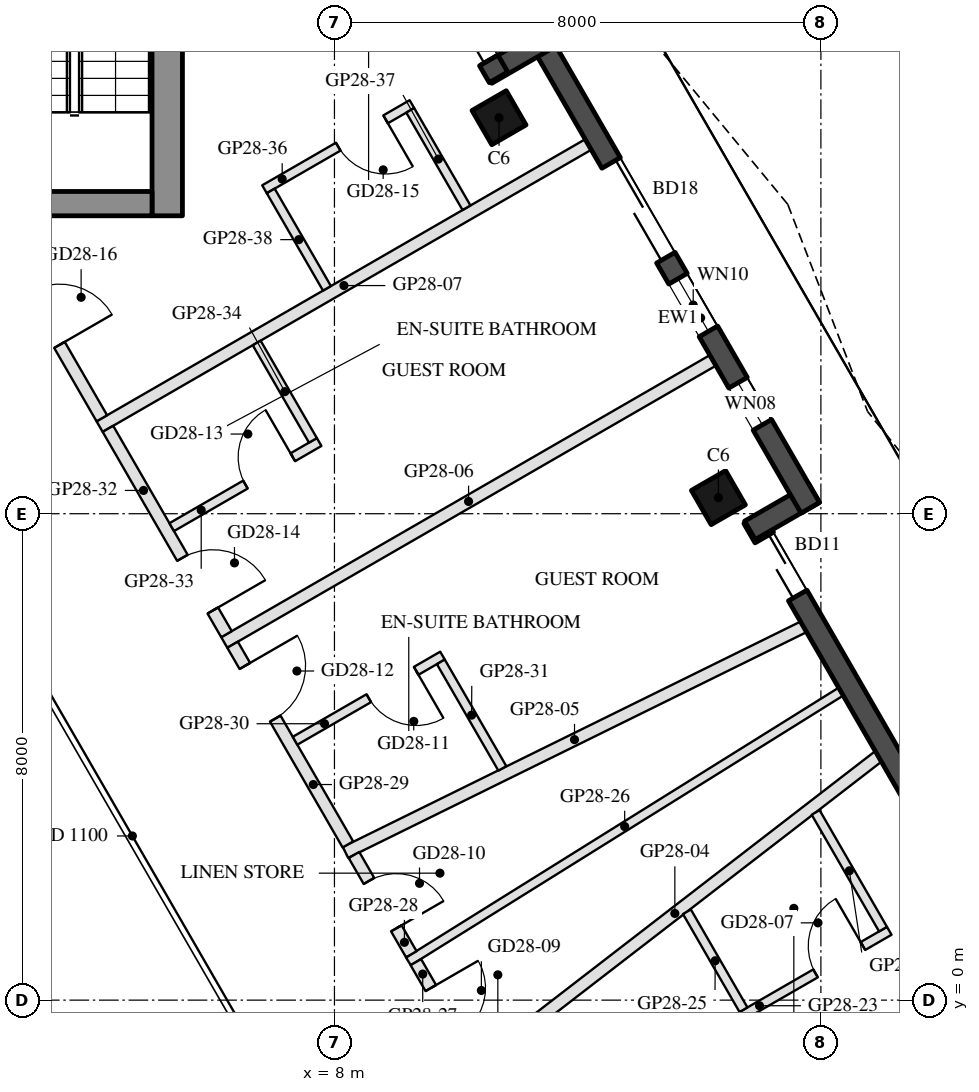
"""IFC4 building model, lengths in metres.
Left out: names, types, materials, properties, quantities, classifications, styles, units other than length and angle.
Written with IfcOpenShell. Run it as: python <this file> out.ifc"""

import sys

from ifc_helpers import new_model, si_unit, direction, frame, frame_2d, origin, origin_2d, place, context, subcontext, project, spatial, rectangle, hollow_rectangle, extrude, boolean, halfspace, element, fill, save


model = new_model("IFC4")
c1 = context("Model", 3, precision=1e-05, world=origin(), true_north=direction((0.0, 1.0)))
c2 = subcontext(c1, "Body", "Model", "MODEL_VIEW")
j1 = project(units=[si_unit("LENGTHUNIT", "METRE"), si_unit("PLANEANGLEUNIT", "RADIAN")], contexts=[c1])
p1 = place(None, origin())
s1 = spatial("IfcSite", under=j1, at=p1, CompositionType="ELEMENT")
p2 = place(p1, origin())
s2 = spatial("IfcBuilding", under=s1, at=p2, CompositionType="ELEMENT")
p3 = place(p2, frame((0.0, 0.0, 280.0)))
s3 = spatial("IfcBuildingStorey", under=s2, at=p3, CompositionType="ELEMENT", Elevation=280.0)
p4 = place(p3, frame((14.314, 8.264, 0.0), z_axis=(0.0, 0.0, 1.0), x_axis=(-0.5, 0.866025403784, 0.0)))
e1 = element("IfcColumn", 1, at=p4, inside=s3, PredefinedType="COLUMN", context=c2, shape_type="SweptSolid", body=[
    boolean("DIFFERENCE", extrude(hollow_rectangle(XDim=0.65, YDim=0.65, WallThickness=0.03, at=origin_2d()), origin(), (0.0, 0.0, 1.0), 3.7), halfspace(frame((0.0, 0.0, 0.037), z_axis=(0.0, 0.0, 1.0), x_axis=(1.0, 0.0, 0.0)), True)),
])
p5 = place(p3, frame((10.707, 14.513, 0.0), z_axis=(0.0, 0.0, 1.0), x_axis=(-0.5, 0.866025403784, 0.0)))
e2 = element("IfcColumn", 2, at=p5, inside=s3, PredefinedType="COLUMN", context=c2, shape_type="SweptSolid", body=[
    boolean("DIFFERENCE", extrude(hollow_rectangle(XDim=0.65, YDim=0.65, WallThickness=0.03, at=origin_2d()), origin(), (0.0, 0.0, 1.0), 3.7), halfspace(frame((0.0, 0.0, 0.04), z_axis=(0.0, 0.0, 1.0), x_axis=(1.0, 0.0, 0.0)), True)),
])
p6 = place(p3, frame((17.913, 2.68, 0.0), z_axis=(0.0, 0.0, 1.0), x_axis=(-0.499985371027, 0.866033849661, 0.0)))
e3 = element("IfcWall", 3, at=p6, inside=s3, PredefinedType="SOLIDWALL", context=c2, shape_type="SweptSolid", body=[
    extrude(rectangle(XDim=6.055, YDim=0.35, at=frame_2d((3.028, 0.0))), origin(), (0.0, 0.0, 1.0), 3.55),
])
p7 = place(p6, frame((4.59, 0.0, 0.0)))
e4 = element("IfcOpeningElement", 4, at=p7, cuts=e3, PredefinedType="OPENING", context=c2, shape_type="SweptSolid", body=[
    extrude(rectangle(XDim=1.1, YDim=2.4, at=frame_2d((0.55, 1.2))), frame((0.0, 0.185, 0.0), z_axis=(0.0, -1.0, 0.0), x_axis=(1.0, 0.0, 0.0)), (0.0, 0.0, 1.0), 0.37),
])
p8 = place(p3, frame((14.833, 7.727, 0.0), z_axis=(0.0, 0.0, 1.0), x_axis=(0.866142280446, 0.499797509021, 0.0)))
e5 = element("IfcWall", 5, at=p8, inside=s3, PredefinedType="SOLIDWALL", context=c2, shape_type="SweptSolid", body=[
    extrude(rectangle(XDim=1.22, YDim=0.35, at=frame_2d((0.61, 0.0))), origin(), (0.0, 0.0, 1.0), 3.55),
])
p9 = place(p3, frame((15.825, 8.097, 0.0), z_axis=(0.0, 0.0, 1.0), x_axis=(-0.500006872736, 0.866021435772, 0.0)))
e6 = element("IfcWall", 6, at=p9, inside=s3, PredefinedType="SOLIDWALL", context=c2, shape_type="SweptSolid", body=[
    extrude(rectangle(XDim=9.015, YDim=0.35, at=frame_2d((4.508, 0.0))), origin(), (0.0, 0.0, 1.0), 3.55),
])
p10 = place(p9, frame((1.575, 0.0, 0.3)))
e7 = element("IfcOpeningElement", 7, at=p10, cuts=e6, PredefinedType="OPENING", context=c2, shape_type="SweptSolid", body=[
    extrude(rectangle(XDim=0.8, YDim=2.65, at=frame_2d((0.4, 1.325))), frame((0.0, 0.185, 0.0), z_axis=(0.0, -1.0, 0.0), x_axis=(1.0, 0.0, 0.0)), (0.0, 0.0, 1.0), 0.37),
])
p11 = place(p9, frame((4.75, 0.0, 0.0)))
e8 = element("IfcOpeningElement", 8, at=p11, cuts=e6, PredefinedType="OPENING", context=c2, shape_type="SweptSolid", body=[
    extrude(rectangle(XDim=1.8, YDim=2.4, at=frame_2d((0.9, 1.2))), frame((0.0, 0.185, 0.0), z_axis=(0.0, -1.0, 0.0), x_axis=(1.0, 0.0, 0.0)), (0.0, 0.0, 1.0), 0.37),
])
p12 = place(p9, frame((3.35, 0.0, 0.3)))
e9 = element("IfcOpeningElement", 9, at=p12, cuts=e6, PredefinedType="OPENING", context=c2, shape_type="SweptSolid", body=[
    extrude(rectangle(XDim=1.0, YDim=2.65, at=frame_2d((0.5, 1.325))), frame((0.0, 0.185, 0.0), z_axis=(0.0, -1.0, 0.0), x_axis=(1.0, 0.0, 0.0)), (0.0, 0.0, 1.0), 0.37),
])
p13 = place(p3, frame((11.557, 15.841, 0.0), z_axis=(0.0, 0.0, 1.0), x_axis=(-0.866005645448, -0.500034220881, 0.0)))
e10 = element("IfcWall", 10, at=p13, inside=s3, PredefinedType="SOLIDWALL", context=c2, shape_type="SweptSolid", body=[
    extrude(rectangle(XDim=1.22, YDim=0.35, at=frame_2d((0.61, 0.0))), origin(), (0.0, 0.0, 1.0), 3.55),
])
p14 = place(p3, frame((10.698, 15.178, 0.0), z_axis=(0.0, 0.0, 1.0), x_axis=(-0.499985371027, 0.866033849661, 0.0)))
e11 = element("IfcWall", 11, at=p14, inside=s3, PredefinedType="SOLIDWALL", context=c2, shape_type="SweptSolid", body=[
    extrude(rectangle(XDim=6.055, YDim=0.35, at=frame_2d((3.028, 0.0))), origin(), (0.0, 0.0, 1.0), 3.55),
])
p15 = place(p14, frame((0.32, 0.0, 0.0)))
e12 = element("IfcOpeningElement", 12, at=p15, cuts=e11, PredefinedType="OPENING", context=c2, shape_type="SweptSolid", body=[
    extrude(rectangle(XDim=2.4, YDim=2.4, at=frame_2d((1.2, 1.2))), frame((0.0, 0.185, 0.0), z_axis=(0.0, -1.0, 0.0), x_axis=(1.0, 0.0, 0.0)), (0.0, 0.0, 1.0), 0.37),
])
p16 = place(p14, frame((3.02, 0.0, 0.3)))
e13 = element("IfcOpeningElement", 13, at=p16, cuts=e11, PredefinedType="OPENING", context=c2, shape_type="SweptSolid", body=[
    extrude(rectangle(XDim=2.7, YDim=2.65, at=frame_2d((1.35, 1.325))), frame((0.0, 0.185, 0.0), z_axis=(0.0, -1.0, 0.0), x_axis=(1.0, 0.0, 0.0)), (0.0, 0.0, 1.0), 0.37),
])
p17 = place(p3, frame((5.25, 12.9, 0.0), z_axis=(0.0, 0.0, 1.0), x_axis=(0.0, 1.0, 0.0)))
e14 = element("IfcWall", 14, at=p17, inside=s3, PredefinedType="SHEAR", context=c2, shape_type="SweptSolid", body=[
    extrude(rectangle(XDim=12.129, YDim=0.5, at=frame_2d((6.064, 0.0))), origin(), (0.0, 0.0, 1.0), 3.5),
])
p18 = place(p3, frame((5.0, 13.1, 0.0), z_axis=(0.0, 0.0, 1.0), x_axis=(-1.0, 0.0, 0.0)))
e15 = element("IfcWall", 15, at=p18, inside=s3, PredefinedType="SHEAR", context=c2, shape_type="SweptSolid", body=[
    extrude(rectangle(XDim=10.0, YDim=0.4, at=frame_2d((5.0, 0.0))), origin(), (0.0, 0.0, 1.0), 3.5),
])
p19 = place(p18, frame((3.55, 0.0, 0.0)))
e16 = element("IfcOpeningElement", 16, at=p19, cuts=e15, PredefinedType="OPENING", context=c2, shape_type="SweptSolid", body=[
    extrude(rectangle(XDim=1.1, YDim=2.1, at=frame_2d((0.55, 1.05))), frame((0.0, 0.21, 0.0), z_axis=(0.0, -1.0, 0.0), x_axis=(1.0, 0.0, 0.0)), (0.0, 0.0, 1.0), 0.42),
])
p20 = place(p18, frame((5.85, 0.0, 0.0)))
e17 = element("IfcOpeningElement", 17, at=p20, cuts=e15, PredefinedType="OPENING", context=c2, shape_type="SweptSolid", body=[
    extrude(rectangle(XDim=1.4, YDim=2.1, at=frame_2d((0.7, 1.05))), frame((0.0, 0.21, 0.0), z_axis=(0.0, -1.0, 0.0), x_axis=(1.0, 0.0, 0.0)), (0.0, 0.0, 1.0), 0.42),
])
p21 = place(p3, frame((16.945, 4.008, 0.0), z_axis=(0.0, 0.0, 1.0), x_axis=(-0.791722394734, -0.610881043801, 0.0)))
e18 = element("IfcWall", 18, at=p21, inside=s3, PredefinedType="PARTITIONING", context=c2, shape_type="SweptSolid", body=[
    extrude(rectangle(XDim=8.454, YDim=0.2, at=frame_2d((4.227, 0.0))), origin(), (0.0, 0.0, 1.0), 3.16),
])
p22 = place(p3, frame((15.715, 6.139, 0.0), z_axis=(0.0, 0.0, 1.0), x_axis=(-0.897120508699, -0.44178591294, 0.0)))
e19 = element("IfcWall", 19, at=p22, inside=s3, PredefinedType="PARTITIONING", context=c2, shape_type="SweptSolid", body=[
    extrude(rectangle(XDim=8.397, YDim=0.2, at=frame_2d((4.198, 0.0))), origin(), (0.0, 0.0, 1.0), 3.16),
])
p23 = place(p3, frame((14.224, 10.521, 0.0), z_axis=(0.0, 0.0, 1.0), x_axis=(-0.866024341471, -0.500001839976, 0.0)))
e20 = element("IfcWall", 20, at=p23, inside=s3, PredefinedType="PARTITIONING", context=c2, shape_type="SweptSolid", body=[
    extrude(rectangle(XDim=9.279, YDim=0.2, at=frame_2d((4.639, 0.0))), origin(), (0.0, 0.0, 1.0), 3.16),
])
p24 = place(p3, frame((12.174, 14.072, 0.0), z_axis=(0.0, 0.0, 1.0), x_axis=(-0.866035734738, -0.499982105836, 0.0)))
e21 = element("IfcWall", 21, at=p24, inside=s3, PredefinedType="PARTITIONING", context=c2, shape_type="SweptSolid", body=[
    extrude(rectangle(XDim=9.279, YDim=0.2, at=frame_2d((4.639, 0.0))), origin(), (0.0, 0.0, 1.0), 3.16),
])
p25 = place(p3, frame((14.699, -0.26, 0.0), z_axis=(0.0, 0.0, 1.0), x_axis=(0.866034573852, 0.49998411664, 0.0)))
e22 = element("IfcWall", 22, at=p25, inside=s3, PredefinedType="PARTITIONING", context=c2, shape_type="SweptSolid", body=[
    extrude(rectangle(XDim=2.8, YDim=0.15, at=frame_2d((1.4, 0.0))), origin(), (0.0, 0.0, 1.0), 3.55),
])
p26 = place(p25, frame((1.4, 0.0, 0.0)))
e23 = element("IfcOpeningElement", 23, at=p26, cuts=e22, PredefinedType="OPENING", context=c2, shape_type="SweptSolid", body=[
    extrude(rectangle(XDim=0.9, YDim=2.1, at=frame_2d((0.45, 1.05))), frame((0.0, 0.085, 0.0), z_axis=(0.0, -1.0, 0.0), x_axis=(1.0, 0.0, 0.0)), (0.0, 0.0, 1.0), 0.17),
])
p27 = place(p3, frame((17.022, 1.167, 0.0), z_axis=(0.0, 0.0, 1.0), x_axis=(-0.499954515395, 0.866051662741, 0.0)))
e24 = element("IfcWall", 24, at=p27, inside=s3, PredefinedType="PARTITIONING", context=c2, shape_type="SweptSolid", body=[
    extrude(rectangle(XDim=2.216, YDim=0.15, at=frame_2d((1.108, 0.0))), origin(), (0.0, 0.0, 1.0), 3.05),
])
p28 = place(p3, frame((14.727, -0.158, 0.0), z_axis=(0.0, 0.0, 1.0), x_axis=(-0.499964847546, 0.866045698112, 0.0)))
e25 = element("IfcWall", 25, at=p28, inside=s3, PredefinedType="PARTITIONING", context=c2, shape_type="SweptSolid", body=[
    extrude(rectangle(XDim=1.86, YDim=0.15, at=frame_2d((0.93, 0.0))), origin(), (0.0, 0.0, 1.0), 3.05),
])
p29 = place(p3, frame((16.33, 5.074, 0.0), z_axis=(0.0, 0.0, 1.0), x_axis=(-0.848469139967, -0.52924485687, 0.0)))
e26 = element("IfcWall", 26, at=p29, inside=s3, PredefinedType="PARTITIONING", context=c2, shape_type="SweptSolid", body=[
    extrude(rectangle(XDim=8.384, YDim=0.15, at=frame_2d((4.192, 0.0))), origin(), (0.0, 0.0, 1.0), 3.16),
])
p30 = place(p3, frame((9.339, 0.625, 0.0), z_axis=(0.0, 0.0, 1.0), x_axis=(0.499999106059, -0.866025919901, 0.0)))
e27 = element("IfcWall", 27, at=p30, inside=s3, PredefinedType="PARTITIONING", context=c2, shape_type="SweptSolid", body=[
    extrude(rectangle(XDim=1.884, YDim=0.2, at=frame_2d((0.942, 0.0))), origin(), (0.0, 0.0, 1.0), 3.55),
])
p31 = place(p30, frame((0.492, 0.0, 0.0)))
e28 = element("IfcOpeningElement", 28, at=p31, cuts=e27, PredefinedType="OPENING", context=c2, shape_type="SweptSolid", body=[
    extrude(rectangle(XDim=0.9, YDim=2.1, at=frame_2d((0.45, 1.05))), frame((0.0, 0.11, 0.0), z_axis=(0.0, -1.0, 0.0), x_axis=(1.0, 0.0, 0.0)), (0.0, 0.0, 1.0), 0.22),
])
p32 = place(p3, frame((8.321, 2.387, 0.0), z_axis=(0.0, 0.0, 1.0), x_axis=(0.500081217305, -0.865978507874, 0.0)))
e29 = element("IfcWall", 29, at=p32, inside=s3, PredefinedType="PARTITIONING", context=c2, shape_type="SweptSolid", body=[
    extrude(rectangle(XDim=1.885, YDim=0.2, at=frame_2d((0.942, 0.0))), origin(), (0.0, 0.0, 1.0), 3.05),
])
p33 = place(p32, frame((0.492, 0.0, 0.0)))
e30 = element("IfcOpeningElement", 30, at=p33, cuts=e29, PredefinedType="OPENING", context=c2, shape_type="SweptSolid", body=[
    extrude(rectangle(XDim=0.9, YDim=2.1, at=frame_2d((0.45, 1.05))), frame((0.0, 0.11, 0.0), z_axis=(0.0, -1.0, 0.0), x_axis=(1.0, 0.0, 0.0)), (0.0, 0.0, 1.0), 0.22),
])
p34 = place(p3, frame((6.325, 5.845, 0.0), z_axis=(0.0, 0.0, 1.0), x_axis=(0.499988034227, -0.866032312117, 0.0)))
e31 = element("IfcWall", 31, at=p34, inside=s3, PredefinedType="PARTITIONING", context=c2, shape_type="SweptSolid", body=[
    extrude(rectangle(XDim=3.793, YDim=0.2, at=frame_2d((1.896, 0.0))), origin(), (0.0, 0.0, 1.0), 3.05),
])
p35 = place(p34, frame((0.403, 0.0, 0.0)))
e32 = element("IfcOpeningElement", 32, at=p35, cuts=e31, PredefinedType="OPENING", context=c2, shape_type="SweptSolid", body=[
    extrude(rectangle(XDim=1.0, YDim=2.1, at=frame_2d((0.5, 1.05))), frame((0.0, 0.11, 0.0), z_axis=(0.0, -1.0, 0.0), x_axis=(1.0, 0.0, 0.0)), (0.0, 0.0, 1.0), 0.22),
])
p36 = place(p3, frame((9.777, 5.666, 0.0), z_axis=(0.0, 0.0, 1.0), x_axis=(-0.865996816683, -0.500049511043, 0.0)))
e33 = element("IfcWall", 33, at=p36, inside=s3, PredefinedType="PARTITIONING", context=c2, shape_type="SweptSolid", body=[
    extrude(rectangle(XDim=2.8, YDim=0.15, at=frame_2d((1.4, 0.0))), origin(), (0.0, 0.0, 1.0), 3.05),
])
p37 = place(p36, frame((0.5, 0.0, 0.0)))
e34 = element("IfcOpeningElement", 34, at=p37, cuts=e33, PredefinedType="OPENING", context=c2, shape_type="SweptSolid", body=[
    extrude(rectangle(XDim=0.9, YDim=2.1, at=frame_2d((0.45, 1.05))), frame((0.0, 0.085, 0.0), z_axis=(0.0, -1.0, 0.0), x_axis=(1.0, 0.0, 0.0)), (0.0, 0.0, 1.0), 0.17),
])
p38 = place(p3, frame((10.761, 3.811, 0.0), z_axis=(0.0, 0.0, 1.0), x_axis=(-0.499941815747, 0.866058993873, 0.0)))
e35 = element("IfcWall", 35, at=p38, inside=s3, PredefinedType="PARTITIONING", context=c2, shape_type="SweptSolid", body=[
    extrude(rectangle(XDim=2.023, YDim=0.15, at=frame_2d((1.012, 0.0))), origin(), (0.0, 0.0, 1.0), 3.05),
])
p39 = place(p3, frame((4.275, 9.396, 0.0), z_axis=(0.0, 0.0, 1.0), x_axis=(0.499997012787, -0.866027128446, 0.0)))
e36 = element("IfcWall", 36, at=p39, inside=s3, PredefinedType="PARTITIONING", context=c2, shape_type="SweptSolid", body=[
    extrude(rectangle(XDim=3.9, YDim=0.2, at=frame_2d((1.95, 0.0))), origin(), (0.0, 0.0, 1.0), 3.05),
])
p40 = place(p39, frame((2.45, 0.0, 0.0)))
e37 = element("IfcOpeningElement", 37, at=p40, cuts=e36, PredefinedType="OPENING", context=c2, shape_type="SweptSolid", body=[
    extrude(rectangle(XDim=1.0, YDim=2.1, at=frame_2d((0.5, 1.05))), frame((0.0, 0.11, 0.0), z_axis=(0.0, -1.0, 0.0), x_axis=(1.0, 0.0, 0.0)), (0.0, 0.0, 1.0), 0.22),
])
p41 = place(p3, frame((5.324, 7.779, 0.0), z_axis=(0.0, 0.0, 1.0), x_axis=(0.865996816683, 0.500049511043, 0.0)))
e38 = element("IfcWall", 38, at=p41, inside=s3, PredefinedType="PARTITIONING", context=c2, shape_type="SweptSolid", body=[
    extrude(rectangle(XDim=2.8, YDim=0.15, at=frame_2d((1.4, 0.0))), origin(), (0.0, 0.0, 1.0), 3.55),
])
p42 = place(p41, frame((1.4, 0.0, 0.0)))
e39 = element("IfcOpeningElement", 39, at=p42, cuts=e38, PredefinedType="OPENING", context=c2, shape_type="SweptSolid", body=[
    extrude(rectangle(XDim=0.9, YDim=2.1, at=frame_2d((0.45, 1.05))), frame((0.0, 0.085, 0.0), z_axis=(0.0, -1.0, 0.0), x_axis=(1.0, 0.0, 0.0)), (0.0, 0.0, 1.0), 0.17),
])
p43 = place(p3, frame((7.646, 9.207, 0.0), z_axis=(0.0, 0.0, 1.0), x_axis=(-0.49994333299, 0.866058118026, 0.0)))
e40 = element("IfcWall", 40, at=p43, inside=s3, PredefinedType="PARTITIONING", context=c2, shape_type="SweptSolid", body=[
    extrude(rectangle(XDim=1.85, YDim=0.15, at=frame_2d((0.925, 0.0))), origin(), (0.0, 0.0, 1.0), 3.55),
])
p44 = place(p3, frame((2.281, 12.85, 0.0), z_axis=(0.0, 0.0, 1.0), x_axis=(0.499979074716, -0.866037484666, 0.0)))
e41 = element("IfcWall", 41, at=p44, inside=s3, PredefinedType="PARTITIONING", context=c2, shape_type="SweptSolid", body=[
    extrude(rectangle(XDim=3.788, YDim=0.2, at=frame_2d((1.894, 0.0))), origin(), (0.0, 0.0, 1.0), 3.05),
])
p45 = place(p44, frame((1.394, 0.0, 0.0)))
e42 = element("IfcOpeningElement", 42, at=p45, cuts=e41, PredefinedType="OPENING", context=c2, shape_type="SweptSolid", body=[
    extrude(rectangle(XDim=1.0, YDim=2.1, at=frame_2d((0.5, 1.05))), frame((0.0, 0.11, 0.0), z_axis=(0.0, -1.0, 0.0), x_axis=(1.0, 0.0, 0.0)), (0.0, 0.0, 1.0), 0.22),
])
p46 = place(p3, frame((9.274, 14.737, 0.0), z_axis=(0.0, 0.0, 1.0), x_axis=(-0.866018616679, -0.500011755427, 0.0)))
e43 = element("IfcWall", 43, at=p46, inside=s3, PredefinedType="PARTITIONING", context=c2, shape_type="SweptSolid", body=[
    extrude(rectangle(XDim=2.8, YDim=0.15, at=frame_2d((1.4, 0.0))), origin(), (0.0, 0.0, 1.0), 3.55),
])
p47 = place(p46, frame((0.5, 0.0, 0.0)))
e44 = element("IfcOpeningElement", 44, at=p47, cuts=e43, PredefinedType="OPENING", context=c2, shape_type="SweptSolid", body=[
    extrude(rectangle(XDim=0.9, YDim=2.1, at=frame_2d((0.45, 1.05))), frame((0.0, 0.085, 0.0), z_axis=(0.0, -1.0, 0.0), x_axis=(1.0, 0.0, 0.0)), (0.0, 0.0, 1.0), 0.17),
])
p48 = place(p3, frame((10.172, 13.032, 0.0), z_axis=(0.0, 0.0, 1.0), x_axis=(-0.500042316284, 0.866000971088, 0.0)))
e45 = element("IfcWall", 45, at=p48, inside=s3, PredefinedType="PARTITIONING", context=c2, shape_type="SweptSolid", body=[
    extrude(rectangle(XDim=1.85, YDim=0.15, at=frame_2d((0.925, 0.0))), origin(), (0.0, 0.0, 1.0), 3.05),
])
p49 = place(p3, frame((7.877, 11.707, 0.0), z_axis=(0.0, 0.0, 1.0), x_axis=(-0.499985172903, 0.866033964044, 0.0)))
e46 = element("IfcWall", 46, at=p49, inside=s3, PredefinedType="PARTITIONING", context=c2, shape_type="SweptSolid", body=[
    extrude(rectangle(XDim=1.85, YDim=0.15, at=frame_2d((0.925, 0.0))), origin(), (0.0, 0.0, 1.0), 3.05),
])
p50 = place(p7, frame((1.1, 0.0, 0.0), z_axis=(0.0, 0.0, 1.0), x_axis=(-1.0, 0.0, 0.0)))
e47 = element("IfcDoor", 47, at=p50, inside=s3, OperationType="SLIDING_TO_LEFT", PredefinedType="DOOR", context=c2, shape_type="SweptSolid", body=[
    extrude(rectangle(XDim=1.1, YDim=2.4, at=frame_2d((0.55, 1.2))), frame((0.0, 0.025, 0.0), z_axis=(0.0, -1.0, 0.0), x_axis=(1.0, 0.0, 0.0)), (0.0, 0.0, 1.0), 0.05),
])
fill(e4, e47)
p51 = place(p10, origin())
e48 = element("IfcWindow", 48, at=p51, inside=s3, PartitioningType="SINGLE_PANEL", PredefinedType="WINDOW", context=c2, shape_type="SweptSolid", body=[
    extrude(rectangle(XDim=0.8, YDim=2.65, at=frame_2d((0.4, 1.325))), frame((0.0, 0.03, 0.0), z_axis=(0.0, -1.0, 0.0), x_axis=(1.0, 0.0, 0.0)), (0.0, 0.0, 1.0), 0.06),
])
fill(e7, e48)
p52 = place(p11, frame((1.8, 0.0, 0.0), z_axis=(0.0, 0.0, 1.0), x_axis=(-1.0, 0.0, 0.0)))
e49 = element("IfcDoor", 49, at=p52, inside=s3, OperationType="SLIDING_TO_LEFT", PredefinedType="DOOR", context=c2, shape_type="SweptSolid", body=[
    extrude(rectangle(XDim=1.8, YDim=2.4, at=frame_2d((0.9, 1.2))), frame((0.0, 0.025, 0.0), z_axis=(0.0, -1.0, 0.0), x_axis=(1.0, 0.0, 0.0)), (0.0, 0.0, 1.0), 0.05),
])
fill(e8, e49)
p53 = place(p12, origin())
e50 = element("IfcWindow", 50, at=p53, inside=s3, PartitioningType="SINGLE_PANEL", PredefinedType="WINDOW", context=c2, shape_type="SweptSolid", body=[
    extrude(rectangle(XDim=1.0, YDim=2.65, at=frame_2d((0.5, 1.325))), frame((0.0, 0.03, 0.0), z_axis=(0.0, -1.0, 0.0), x_axis=(1.0, 0.0, 0.0)), (0.0, 0.0, 1.0), 0.06),
])
fill(e9, e50)
p54 = place(p15, frame((2.4, 0.0, 0.0), z_axis=(0.0, 0.0, 1.0), x_axis=(-1.0, 0.0, 0.0)))
e51 = element("IfcDoor", 51, at=p54, inside=s3, OperationType="SLIDING_TO_LEFT", PredefinedType="DOOR", context=c2, shape_type="SweptSolid", body=[
    extrude(rectangle(XDim=2.4, YDim=2.4, at=frame_2d((1.2, 1.2))), frame((0.0, 0.025, 0.0), z_axis=(0.0, -1.0, 0.0), x_axis=(1.0, 0.0, 0.0)), (0.0, 0.0, 1.0), 0.05),
])
fill(e12, e51)
p55 = place(p26, origin())
e52 = element("IfcDoor", 52, at=p55, inside=s3, OperationType="SINGLE_SWING_RIGHT", PredefinedType="DOOR", context=c2, shape_type="SweptSolid", body=[
    extrude(rectangle(XDim=0.9, YDim=2.1, at=frame_2d((0.45, 1.05))), frame((0.0, 0.025, 0.0), z_axis=(0.0, -1.0, 0.0), x_axis=(1.0, 0.0, 0.0)), (0.0, 0.0, 1.0), 0.05),
])
fill(e23, e52)
p56 = place(p31, origin())
e53 = element("IfcDoor", 53, at=p56, inside=s3, OperationType="SINGLE_SWING_LEFT", PredefinedType="DOOR", context=c2, shape_type="SweptSolid", body=[
    extrude(rectangle(XDim=0.9, YDim=2.1, at=frame_2d((0.45, 1.05))), frame((0.0, 0.025, 0.0), z_axis=(0.0, -1.0, 0.0), x_axis=(1.0, 0.0, 0.0)), (0.0, 0.0, 1.0), 0.05),
])
fill(e28, e53)
p57 = place(p33, origin())
e54 = element("IfcDoor", 54, at=p57, inside=s3, OperationType="SINGLE_SWING_RIGHT", PredefinedType="DOOR", context=c2, shape_type="SweptSolid", body=[
    extrude(rectangle(XDim=0.9, YDim=2.1, at=frame_2d((0.45, 1.05))), frame((0.0, 0.025, 0.0), z_axis=(0.0, -1.0, 0.0), x_axis=(1.0, 0.0, 0.0)), (0.0, 0.0, 1.0), 0.05),
])
fill(e30, e54)
p58 = place(p37, origin())
e55 = element("IfcDoor", 55, at=p58, inside=s3, OperationType="SINGLE_SWING_LEFT", PredefinedType="DOOR", context=c2, shape_type="SweptSolid", body=[
    extrude(rectangle(XDim=0.9, YDim=2.1, at=frame_2d((0.45, 1.05))), frame((0.0, 0.025, 0.0), z_axis=(0.0, -1.0, 0.0), x_axis=(1.0, 0.0, 0.0)), (0.0, 0.0, 1.0), 0.05),
])
fill(e34, e55)
p59 = place(p35, origin())
e56 = element("IfcDoor", 56, at=p59, inside=s3, OperationType="SINGLE_SWING_LEFT", PredefinedType="DOOR", context=c2, shape_type="SweptSolid", body=[
    extrude(rectangle(XDim=1.0, YDim=2.1, at=frame_2d((0.5, 1.05))), frame((0.0, 0.025, 0.0), z_axis=(0.0, -1.0, 0.0), x_axis=(1.0, 0.0, 0.0)), (0.0, 0.0, 1.0), 0.05),
])
fill(e32, e56)
p60 = place(p42, origin())
e57 = element("IfcDoor", 57, at=p60, inside=s3, OperationType="SINGLE_SWING_RIGHT", PredefinedType="DOOR", context=c2, shape_type="SweptSolid", body=[
    extrude(rectangle(XDim=0.9, YDim=2.1, at=frame_2d((0.45, 1.05))), frame((0.0, 0.025, 0.0), z_axis=(0.0, -1.0, 0.0), x_axis=(1.0, 0.0, 0.0)), (0.0, 0.0, 1.0), 0.05),
])
fill(e39, e57)
p61 = place(p40, origin())
e58 = element("IfcDoor", 58, at=p61, inside=s3, OperationType="SINGLE_SWING_RIGHT", PredefinedType="DOOR", context=c2, shape_type="SweptSolid", body=[
    extrude(rectangle(XDim=1.0, YDim=2.1, at=frame_2d((0.5, 1.05))), frame((0.0, 0.025, 0.0), z_axis=(0.0, -1.0, 0.0), x_axis=(1.0, 0.0, 0.0)), (0.0, 0.0, 1.0), 0.05),
])
fill(e37, e58)
p62 = place(p47, origin())
e59 = element("IfcDoor", 59, at=p62, inside=s3, OperationType="SINGLE_SWING_LEFT", PredefinedType="DOOR", context=c2, shape_type="SweptSolid", body=[
    extrude(rectangle(XDim=0.9, YDim=2.1, at=frame_2d((0.45, 1.05))), frame((0.0, 0.025, 0.0), z_axis=(0.0, -1.0, 0.0), x_axis=(1.0, 0.0, 0.0)), (0.0, 0.0, 1.0), 0.05),
])
fill(e44, e59)
p63 = place(p45, origin())
e60 = element("IfcDoor", 60, at=p63, inside=s3, OperationType="SINGLE_SWING_RIGHT", PredefinedType="DOOR", context=c2, shape_type="SweptSolid", body=[
    extrude(rectangle(XDim=1.0, YDim=2.1, at=frame_2d((0.5, 1.05))), frame((0.0, 0.025, 0.0), z_axis=(0.0, -1.0, 0.0), x_axis=(1.0, 0.0, 0.0)), (0.0, 0.0, 1.0), 0.05),
])
fill(e42, e60)
save(model, sys.argv[1])
